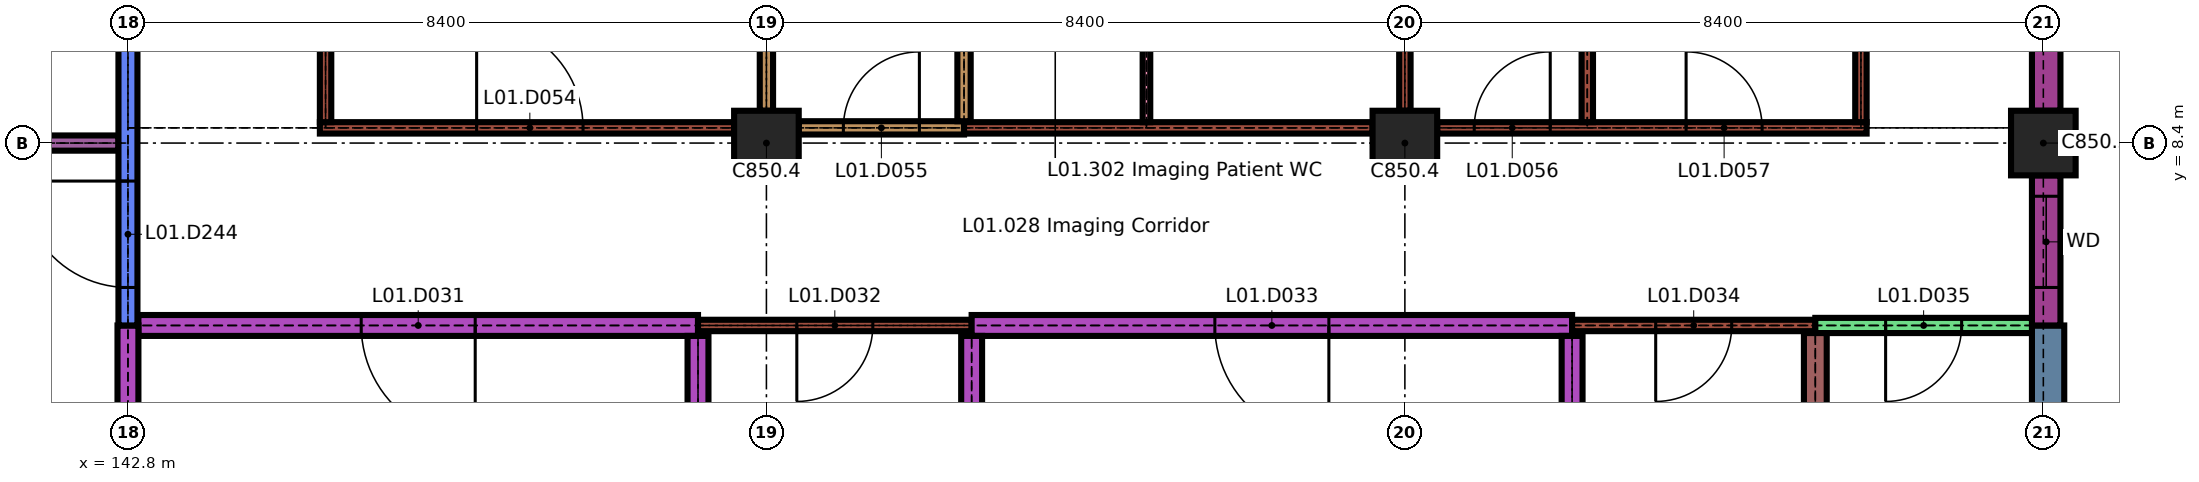
"""IFC4 building model, lengths in metres.
Left out: names, types, materials, properties, quantities, classifications, styles, units other than length and angle.
Written with IfcOpenShell. Run it as: python <this file> out.ifc"""

import sys

from ifc_helpers import new_model, si_unit, direction, frame, frame_2d, origin, origin_2d, place, context, subcontext, project, spatial, rectangle, extrude, element, fill, save


model = new_model("IFC4")
c1 = context("Model", 3, precision=1e-05, world=origin(), true_north=direction((0.0, 1.0)))
c2 = subcontext(c1, "Body", "Model", "MODEL_VIEW")
j1 = project(units=[si_unit("LENGTHUNIT", "METRE"), si_unit("PLANEANGLEUNIT", "RADIAN")], contexts=[c1])
p1 = place(None, origin())
s1 = spatial("IfcSite", under=j1, at=p1, CompositionType="ELEMENT")
p2 = place(p1, origin())
s2 = spatial("IfcBuilding", under=s1, at=p2, CompositionType="ELEMENT")
p3 = place(p2, frame((0.0, 0.0, 4.5)))
s3 = spatial("IfcBuildingStorey", under=s2, at=p3, CompositionType="ELEMENT", Elevation=4.5)
for number, where, z_axis, x_axis in (
    (1, (151.2, 8.4, 0.0), (0.0, 0.0, 1.0), (1.0, 0.0, 0.0)),
    (2, (159.6, 8.4, 0.0), (0.0, 0.0, 1.0), (1.0, 0.0, 0.0)),
    (3, (168.0, 8.4, 0.0), (0.0, 0.0, 1.0), (1.0, 0.0, 0.0)),
):
    element("IfcColumn", number, at=place(p3, frame(where, z_axis=z_axis, x_axis=x_axis)), inside=s3, PredefinedType="COLUMN", context=c2, shape_type="SweptSolid", body=[
        extrude(rectangle(XDim=0.85, YDim=0.85, at=origin_2d()), origin(), (0.0, 0.0, 1.0), 3.45),
    ])
p4 = place(p3, frame((168.062, 0.425, 0.0), z_axis=(0.0, 0.0, 1.0), x_axis=(0.0, 1.0, 0.0)))
e4 = element("IfcWall", 4, at=p4, inside=s3, PredefinedType="SOLIDWALL", context=c2, shape_type="SweptSolid", body=[
    extrude(rectangle(XDim=5.575, YDim=0.425, at=frame_2d((2.788, 0.0))), origin(), (0.0, 0.0, 1.0), 3.15),
])
p5 = place(p3, frame((168.038, 6.0, 0.0), z_axis=(0.0, 0.0, 1.0), x_axis=(0.0, 1.0, 0.0)))
e5 = element("IfcWall", 5, at=p5, inside=s3, PredefinedType="SOLIDWALL", context=c2, shape_type="SweptSolid", body=[
    extrude(rectangle(XDim=1.975, YDim=0.375, at=frame_2d((0.988, 0.0))), origin(), (0.0, 0.0, 1.0), 3.15),
])
p6 = place(p5, frame((0.5, 0.0, 0.9)))
e6 = element("IfcOpeningElement", 6, at=p6, cuts=e5, PredefinedType="OPENING", context=c2, shape_type="SweptSolid", body=[
    extrude(rectangle(XDim=1.2, YDim=1.5, at=frame_2d((0.6, 0.75))), frame((0.0, 0.198, 0.0), z_axis=(0.0, -1.0, 0.0), x_axis=(1.0, 0.0, 0.0)), (0.0, 0.0, 1.0), 0.395),
])
p7 = place(p3, frame((168.038, 8.825, 0.0), z_axis=(0.0, 0.0, 1.0), x_axis=(0.0, 1.0, 0.0)))
e7 = element("IfcWall", 7, at=p7, inside=s3, PredefinedType="SOLIDWALL", context=c2, shape_type="SweptSolid", body=[
    extrude(rectangle(XDim=1.175, YDim=0.375, at=frame_2d((0.587, 0.0))), origin(), (0.0, 0.0, 1.0), 3.15),
])
p8 = place(p3, frame((142.938, 6.0, 0.0), z_axis=(0.0, 0.0, 1.0), x_axis=(1.0, 0.0, 0.0)))
e8 = element("IfcWall", 8, at=p8, inside=s3, PredefinedType="SOLIDWALL", context=c2, shape_type="SweptSolid", body=[
    extrude(rectangle(XDim=7.363, YDim=0.275, at=frame_2d((3.681, 0.0))), origin(), (0.0, 0.0, 1.0), 3.45),
])
p9 = place(p8, frame((2.931, 0.0, 0.0)))
e9 = element("IfcOpeningElement", 9, at=p9, cuts=e8, PredefinedType="OPENING", context=c2, shape_type="SweptSolid", body=[
    extrude(rectangle(XDim=1.5, YDim=2.4, at=frame_2d((0.75, 1.2))), frame((0.0, 0.147, 0.0), z_axis=(0.0, -1.0, 0.0), x_axis=(1.0, 0.0, 0.0)), (0.0, 0.0, 1.0), 0.295),
])
p10 = place(p3, frame((150.3, 6.0, 0.0), z_axis=(0.0, 0.0, 1.0), x_axis=(1.0, 0.0, 0.0)))
e10 = element("IfcWall", 10, at=p10, inside=s3, PredefinedType="PARTITIONING", context=c2, shape_type="SweptSolid", body=[
    extrude(rectangle(XDim=3.6, YDim=0.15, at=frame_2d((1.8, 0.0))), origin(), (0.0, 0.0, 1.0), 3.45),
])
p11 = place(p10, frame((1.3, 0.0, 0.0)))
e11 = element("IfcOpeningElement", 11, at=p11, cuts=e10, PredefinedType="OPENING", context=c2, shape_type="SweptSolid", body=[
    extrude(rectangle(XDim=1.0, YDim=2.1, at=frame_2d((0.5, 1.05))), frame((0.0, 0.085, 0.0), z_axis=(0.0, -1.0, 0.0), x_axis=(1.0, 0.0, 0.0)), (0.0, 0.0, 1.0), 0.17),
])
p12 = place(p3, frame((153.9, 6.0, 0.0), z_axis=(0.0, 0.0, 1.0), x_axis=(1.0, 0.0, 0.0)))
e12 = element("IfcWall", 12, at=p12, inside=s3, PredefinedType="SOLIDWALL", context=c2, shape_type="SweptSolid", body=[
    extrude(rectangle(XDim=7.9, YDim=0.275, at=frame_2d((3.95, 0.0))), origin(), (0.0, 0.0, 1.0), 3.45),
])
p13 = place(p12, frame((3.2, 0.0, 0.0)))
e13 = element("IfcOpeningElement", 13, at=p13, cuts=e12, PredefinedType="OPENING", context=c2, shape_type="SweptSolid", body=[
    extrude(rectangle(XDim=1.5, YDim=2.4, at=frame_2d((0.75, 1.2))), frame((0.0, 0.147, 0.0), z_axis=(0.0, -1.0, 0.0), x_axis=(1.0, 0.0, 0.0)), (0.0, 0.0, 1.0), 0.295),
])
p14 = place(p3, frame((161.8, 6.0, 0.0), z_axis=(0.0, 0.0, 1.0), x_axis=(1.0, 0.0, 0.0)))
e14 = element("IfcWall", 14, at=p14, inside=s3, PredefinedType="PARTITIONING", context=c2, shape_type="SweptSolid", body=[
    extrude(rectangle(XDim=3.2, YDim=0.15, at=frame_2d((1.6, 0.0))), origin(), (0.0, 0.0, 1.0), 3.45),
])
p15 = place(p14, frame((1.1, 0.0, 0.0)))
e15 = element("IfcOpeningElement", 15, at=p15, cuts=e14, PredefinedType="OPENING", context=c2, shape_type="SweptSolid", body=[
    extrude(rectangle(XDim=1.0, YDim=2.1, at=frame_2d((0.5, 1.05))), frame((0.0, 0.085, 0.0), z_axis=(0.0, -1.0, 0.0), x_axis=(1.0, 0.0, 0.0)), (0.0, 0.0, 1.0), 0.17),
])
p16 = place(p3, frame((165.0, 6.0, 0.0), z_axis=(0.0, 0.0, 1.0), x_axis=(1.0, 0.0, 0.0)))
e16 = element("IfcWall", 16, at=p16, inside=s3, PredefinedType="SOLIDWALL", context=c2, shape_type="SweptSolid", body=[
    extrude(rectangle(XDim=2.85, YDim=0.2, at=frame_2d((1.425, 0.0))), origin(), (0.0, 0.0, 1.0), 3.45),
])
p17 = place(p16, frame((0.925, 0.0, 0.0)))
e17 = element("IfcOpeningElement", 17, at=p17, cuts=e16, PredefinedType="OPENING", context=c2, shape_type="SweptSolid", body=[
    extrude(rectangle(XDim=1.0, YDim=2.1, at=frame_2d((0.5, 1.05))), frame((0.0, 0.11, 0.0), z_axis=(0.0, -1.0, 0.0), x_axis=(1.0, 0.0, 0.0)), (0.0, 0.0, 1.0), 0.22),
])
p18 = place(p3, frame((134.5, 8.4, 0.0), z_axis=(0.0, 0.0, 1.0), x_axis=(1.0, 0.0, 0.0)))
e18 = element("IfcWall", 18, at=p18, inside=s3, PredefinedType="PARTITIONING", context=c2, shape_type="SweptSolid", body=[
    extrude(rectangle(XDim=8.175, YDim=0.2, at=frame_2d((4.087, 0.0))), origin(), (0.0, 0.0, 1.0), 3.45),
])
p19 = place(p18, frame((3.387, 0.0, 0.0)))
e19 = element("IfcOpeningElement", 19, at=p19, cuts=e18, PredefinedType="OPENING", context=c2, shape_type="SweptSolid", body=[
    extrude(rectangle(XDim=1.4, YDim=2.1, at=frame_2d((0.7, 1.05))), frame((0.0, 0.11, 0.0), z_axis=(0.0, -1.0, 0.0), x_axis=(1.0, 0.0, 0.0)), (0.0, 0.0, 1.0), 0.22),
])
p20 = place(p3, frame((145.325, 8.6, 0.0), z_axis=(0.0, 0.0, 1.0), x_axis=(1.0, 0.0, 0.0)))
e20 = element("IfcWall", 20, at=p20, inside=s3, PredefinedType="PARTITIONING", context=c2, shape_type="SweptSolid", body=[
    extrude(rectangle(XDim=5.45, YDim=0.15, at=frame_2d((2.725, 0.0))), origin(), (0.0, 0.0, 1.0), 3.45),
])
p21 = place(p20, frame((2.062, 0.0, 0.0)))
e21 = element("IfcOpeningElement", 21, at=p21, cuts=e20, PredefinedType="OPENING", context=c2, shape_type="SweptSolid", body=[
    extrude(rectangle(XDim=1.4, YDim=2.1, at=frame_2d((0.7, 1.05))), frame((0.0, 0.085, 0.0), z_axis=(0.0, -1.0, 0.0), x_axis=(1.0, 0.0, 0.0)), (0.0, 0.0, 1.0), 0.17),
])
p22 = place(p3, frame((151.625, 8.6, 0.0), z_axis=(0.0, 0.0, 1.0), x_axis=(1.0, 0.0, 0.0)))
e22 = element("IfcWall", 22, at=p22, inside=s3, PredefinedType="PARTITIONING", context=c2, shape_type="SweptSolid", body=[
    extrude(rectangle(XDim=2.175, YDim=0.175, at=frame_2d((1.087, 0.0))), origin(), (0.0, 0.0, 1.0), 3.45),
])
p23 = place(p22, frame((0.587, 0.0, 0.0)))
e23 = element("IfcOpeningElement", 23, at=p23, cuts=e22, PredefinedType="OPENING", context=c2, shape_type="SweptSolid", body=[
    extrude(rectangle(XDim=1.0, YDim=2.1, at=frame_2d((0.5, 1.05))), frame((0.0, 0.097, 0.0), z_axis=(0.0, -1.0, 0.0), x_axis=(1.0, 0.0, 0.0)), (0.0, 0.0, 1.0), 0.195),
])
p24 = place(p3, frame((153.8, 8.6, 0.0), z_axis=(0.0, 0.0, 1.0), x_axis=(1.0, 0.0, 0.0)))
e24 = element("IfcWall", 24, at=p24, inside=s3, PredefinedType="PARTITIONING", context=c2, shape_type="SweptSolid", body=[
    extrude(rectangle(XDim=5.375, YDim=0.15, at=frame_2d((2.688, 0.0))), origin(), (0.0, 0.0, 1.0), 3.45),
])
p25 = place(p3, frame((160.025, 8.6, 0.0), z_axis=(0.0, 0.0, 1.0), x_axis=(1.0, 0.0, 0.0)))
e25 = element("IfcWall", 25, at=p25, inside=s3, PredefinedType="PARTITIONING", context=c2, shape_type="SweptSolid", body=[
    extrude(rectangle(XDim=5.65, YDim=0.15, at=frame_2d((2.825, 0.0))), origin(), (0.0, 0.0, 1.0), 3.45),
])
p26 = place(p25, frame((0.488, 0.0, 0.0)))
e26 = element("IfcOpeningElement", 26, at=p26, cuts=e25, PredefinedType="OPENING", context=c2, shape_type="SweptSolid", body=[
    extrude(rectangle(XDim=1.0, YDim=2.1, at=frame_2d((0.5, 1.05))), frame((0.0, 0.085, 0.0), z_axis=(0.0, -1.0, 0.0), x_axis=(1.0, 0.0, 0.0)), (0.0, 0.0, 1.0), 0.17),
])
p27 = place(p25, frame((3.275, 0.0, 0.0)))
e27 = element("IfcOpeningElement", 27, at=p27, cuts=e25, PredefinedType="OPENING", context=c2, shape_type="SweptSolid", body=[
    extrude(rectangle(XDim=1.0, YDim=2.1, at=frame_2d((0.5, 1.05))), frame((0.0, 0.085, 0.0), z_axis=(0.0, -1.0, 0.0), x_axis=(1.0, 0.0, 0.0)), (0.0, 0.0, 1.0), 0.17),
])
p28 = place(p3, frame((142.8, 3.6, 0.0), z_axis=(0.0, 0.0, 1.0), x_axis=(0.0, 1.0, 0.0)))
e28 = element("IfcWall", 28, at=p28, inside=s3, PredefinedType="SOLIDWALL", context=c2, shape_type="SweptSolid", body=[
    extrude(rectangle(XDim=2.4, YDim=0.275, at=frame_2d((1.2, 0.0))), origin(), (0.0, 0.0, 1.0), 3.45),
])
p29 = place(p3, frame((142.8, 6.0, 0.0), z_axis=(0.0, 0.0, 1.0), x_axis=(0.0, 1.0, 0.0)))
e29 = element("IfcWall", 29, at=p29, inside=s3, PredefinedType="SOLIDWALL", context=c2, shape_type="SweptSolid", body=[
    extrude(rectangle(XDim=10.7, YDim=0.25, at=frame_2d((5.35, 0.0))), origin(), (0.0, 0.0, 1.0), 3.45),
])
p30 = place(p29, frame((0.5, 0.0, 0.0)))
e30 = element("IfcOpeningElement", 30, at=p30, cuts=e29, PredefinedType="OPENING", context=c2, shape_type="SweptSolid", body=[
    extrude(rectangle(XDim=1.4, YDim=2.1, at=frame_2d((0.7, 1.05))), frame((0.0, 0.135, 0.0), z_axis=(0.0, -1.0, 0.0), x_axis=(1.0, 0.0, 0.0)), (0.0, 0.0, 1.0), 0.27),
])
p31 = place(p29, frame((8.55, 0.0, 0.0)))
e31 = element("IfcOpeningElement", 31, at=p31, cuts=e29, PredefinedType="OPENING", context=c2, shape_type="SweptSolid", body=[
    extrude(rectangle(XDim=1.8, YDim=2.4, at=frame_2d((0.9, 1.2))), frame((0.0, 0.135, 0.0), z_axis=(0.0, -1.0, 0.0), x_axis=(1.0, 0.0, 0.0)), (0.0, 0.0, 1.0), 0.27),
])
p32 = place(p3, frame((145.4, 8.675, 0.0), z_axis=(0.0, 0.0, 1.0), x_axis=(0.0, 1.0, 0.0)))
e32 = element("IfcWall", 32, at=p32, inside=s3, PredefinedType="PARTITIONING", context=c2, shape_type="SweptSolid", body=[
    extrude(rectangle(XDim=5.45, YDim=0.15, at=frame_2d((2.725, 0.0))), origin(), (0.0, 0.0, 1.0), 3.45),
])
p33 = place(p3, frame((150.3, 0.15, 0.0), z_axis=(0.0, 0.0, 1.0), x_axis=(0.0, 1.0, 0.0)))
e33 = element("IfcWall", 33, at=p33, inside=s3, PredefinedType="SOLIDWALL", context=c2, shape_type="SweptSolid", body=[
    extrude(rectangle(XDim=5.713, YDim=0.275, at=frame_2d((2.856, 0.0))), origin(), (0.0, 0.0, 1.0), 3.45),
])
p34 = place(p33, frame((2.356, 0.0, 0.0)))
e34 = element("IfcOpeningElement", 34, at=p34, cuts=e33, PredefinedType="OPENING", context=c2, shape_type="SweptSolid", body=[
    extrude(rectangle(XDim=1.0, YDim=2.1, at=frame_2d((0.5, 1.05))), frame((0.0, 0.147, 0.0), z_axis=(0.0, -1.0, 0.0), x_axis=(1.0, 0.0, 0.0)), (0.0, 0.0, 1.0), 0.295),
])
p35 = place(p3, frame((151.2, 8.825, 0.0), z_axis=(0.0, 0.0, 1.0), x_axis=(0.0, 1.0, 0.0)))
e35 = element("IfcWall", 35, at=p35, inside=s3, PredefinedType="PARTITIONING", context=c2, shape_type="SweptSolid", body=[
    extrude(rectangle(XDim=5.288, YDim=0.175, at=frame_2d((2.644, 0.0))), origin(), (0.0, 0.0, 1.0), 3.45),
])
p36 = place(p3, frame((153.8, 8.688, 0.0), z_axis=(0.0, 0.0, 1.0), x_axis=(0.0, 1.0, 0.0)))
e36 = element("IfcWall", 36, at=p36, inside=s3, PredefinedType="PARTITIONING", context=c2, shape_type="SweptSolid", body=[
    extrude(rectangle(XDim=5.425, YDim=0.175, at=frame_2d((2.712, 0.0))), origin(), (0.0, 0.0, 1.0), 3.45),
])
p37 = place(p3, frame((153.9, 0.15, 0.0), z_axis=(0.0, 0.0, 1.0), x_axis=(0.0, 1.0, 0.0)))
e37 = element("IfcWall", 37, at=p37, inside=s3, PredefinedType="SOLIDWALL", context=c2, shape_type="SweptSolid", body=[
    extrude(rectangle(XDim=5.713, YDim=0.275, at=frame_2d((2.856, 0.0))), origin(), (0.0, 0.0, 1.0), 3.45),
])
p38 = place(p3, frame((156.2, 8.675, 0.0), z_axis=(0.0, 0.0, 1.0), x_axis=(0.0, 1.0, 0.0)))
e38 = element("IfcWall", 38, at=p38, inside=s3, PredefinedType="PARTITIONING", context=c2, shape_type="SweptSolid", body=[
    extrude(rectangle(XDim=5.45, YDim=0.1, at=frame_2d((2.725, 0.0))), origin(), (0.0, 0.0, 1.0), 3.45),
])
p39 = place(p3, frame((159.6, 8.825, 0.0), z_axis=(0.0, 0.0, 1.0), x_axis=(0.0, 1.0, 0.0)))
e39 = element("IfcWall", 39, at=p39, inside=s3, PredefinedType="PARTITIONING", context=c2, shape_type="SweptSolid", body=[
    extrude(rectangle(XDim=5.3, YDim=0.15, at=frame_2d((2.65, 0.0))), origin(), (0.0, 0.0, 1.0), 3.45),
])
p40 = place(p3, frame((161.8, 0.15, 0.0), z_axis=(0.0, 0.0, 1.0), x_axis=(0.0, 1.0, 0.0)))
e40 = element("IfcWall", 40, at=p40, inside=s3, PredefinedType="SOLIDWALL", context=c2, shape_type="SweptSolid", body=[
    extrude(rectangle(XDim=5.713, YDim=0.275, at=frame_2d((2.856, 0.0))), origin(), (0.0, 0.0, 1.0), 3.45),
])
p41 = place(p40, frame((2.356, 0.0, 0.0)))
e41 = element("IfcOpeningElement", 41, at=p41, cuts=e40, PredefinedType="OPENING", context=c2, shape_type="SweptSolid", body=[
    extrude(rectangle(XDim=1.0, YDim=2.1, at=frame_2d((0.5, 1.05))), frame((0.0, 0.147, 0.0), z_axis=(0.0, -1.0, 0.0), x_axis=(1.0, 0.0, 0.0)), (0.0, 0.0, 1.0), 0.295),
])
p42 = place(p3, frame((162.0, 8.675, 0.0), z_axis=(0.0, 0.0, 1.0), x_axis=(0.0, 1.0, 0.0)))
e42 = element("IfcWall", 42, at=p42, inside=s3, PredefinedType="PARTITIONING", context=c2, shape_type="SweptSolid", body=[
    extrude(rectangle(XDim=5.45, YDim=0.15, at=frame_2d((2.725, 0.0))), origin(), (0.0, 0.0, 1.0), 3.45),
])
p43 = place(p3, frame((165.0, 0.15, 0.0), z_axis=(0.0, 0.0, 1.0), x_axis=(0.0, 1.0, 0.0)))
e43 = element("IfcWall", 43, at=p43, inside=s3, PredefinedType="SOLIDWALL", context=c2, shape_type="SweptSolid", body=[
    extrude(rectangle(XDim=5.75, YDim=0.3, at=frame_2d((2.875, 0.0))), origin(), (0.0, 0.0, 1.0), 3.45),
])
p44 = place(p3, frame((165.6, 8.675, 0.0), z_axis=(0.0, 0.0, 1.0), x_axis=(0.0, 1.0, 0.0)))
e44 = element("IfcWall", 44, at=p44, inside=s3, PredefinedType="PARTITIONING", context=c2, shape_type="SweptSolid", body=[
    extrude(rectangle(XDim=5.45, YDim=0.15, at=frame_2d((2.725, 0.0))), origin(), (0.0, 0.0, 1.0), 3.45),
])
p45 = place(p6, origin())
e45 = element("IfcWindow", 45, at=p45, inside=s3, PartitioningType="SINGLE_PANEL", PredefinedType="WINDOW", context=c2, shape_type="SweptSolid", body=[
    extrude(rectangle(XDim=1.2, YDim=1.5, at=frame_2d((0.6, 0.75))), frame((0.0, 0.03, 0.0), z_axis=(0.0, -1.0, 0.0), x_axis=(1.0, 0.0, 0.0)), (0.0, 0.0, 1.0), 0.06),
])
fill(e6, e45)
p46 = place(p9, origin())
e46 = element("IfcDoor", 46, at=p46, inside=s3, OperationType="SINGLE_SWING_RIGHT", PredefinedType="DOOR", context=c2, shape_type="SweptSolid", body=[
    extrude(rectangle(XDim=1.5, YDim=2.4, at=frame_2d((0.75, 1.2))), frame((0.0, 0.045, 0.0), z_axis=(0.0, -1.0, 0.0), x_axis=(1.0, 0.0, 0.0)), (0.0, 0.0, 1.0), 0.09),
])
fill(e9, e46)
p47 = place(p11, origin())
e47 = element("IfcDoor", 47, at=p47, inside=s3, OperationType="SINGLE_SWING_LEFT", PredefinedType="DOOR", context=c2, shape_type="SweptSolid", body=[
    extrude(rectangle(XDim=1.0, YDim=2.1, at=frame_2d((0.5, 1.05))), frame((0.0, 0.025, 0.0), z_axis=(0.0, -1.0, 0.0), x_axis=(1.0, 0.0, 0.0)), (0.0, 0.0, 1.0), 0.05),
])
fill(e11, e47)
p48 = place(p13, origin())
e48 = element("IfcDoor", 48, at=p48, inside=s3, OperationType="SINGLE_SWING_RIGHT", PredefinedType="DOOR", context=c2, shape_type="SweptSolid", body=[
    extrude(rectangle(XDim=1.5, YDim=2.4, at=frame_2d((0.75, 1.2))), frame((0.0, 0.045, 0.0), z_axis=(0.0, -1.0, 0.0), x_axis=(1.0, 0.0, 0.0)), (0.0, 0.0, 1.0), 0.09),
])
fill(e13, e48)
p49 = place(p15, origin())
e49 = element("IfcDoor", 49, at=p49, inside=s3, OperationType="SINGLE_SWING_LEFT", PredefinedType="DOOR", context=c2, shape_type="SweptSolid", body=[
    extrude(rectangle(XDim=1.0, YDim=2.1, at=frame_2d((0.5, 1.05))), frame((0.0, 0.025, 0.0), z_axis=(0.0, -1.0, 0.0), x_axis=(1.0, 0.0, 0.0)), (0.0, 0.0, 1.0), 0.05),
])
fill(e15, e49)
p50 = place(p17, origin())
e50 = element("IfcDoor", 50, at=p50, inside=s3, OperationType="SINGLE_SWING_LEFT", PredefinedType="DOOR", context=c2, shape_type="SweptSolid", body=[
    extrude(rectangle(XDim=1.0, YDim=2.1, at=frame_2d((0.5, 1.05))), frame((0.0, 0.025, 0.0), z_axis=(0.0, -1.0, 0.0), x_axis=(1.0, 0.0, 0.0)), (0.0, 0.0, 1.0), 0.05),
])
fill(e17, e50)
p51 = place(p21, origin())
e51 = element("IfcDoor", 51, at=p51, inside=s3, OperationType="SINGLE_SWING_RIGHT", PredefinedType="DOOR", context=c2, shape_type="SweptSolid", body=[
    extrude(rectangle(XDim=1.4, YDim=2.1, at=frame_2d((0.7, 1.05))), frame((0.0, 0.025, 0.0), z_axis=(0.0, -1.0, 0.0), x_axis=(1.0, 0.0, 0.0)), (0.0, 0.0, 1.0), 0.05),
])
fill(e21, e51)
p52 = place(p23, origin())
e52 = element("IfcDoor", 52, at=p52, inside=s3, OperationType="SINGLE_SWING_LEFT", PredefinedType="DOOR", context=c2, shape_type="SweptSolid", body=[
    extrude(rectangle(XDim=1.0, YDim=2.1, at=frame_2d((0.5, 1.05))), frame((0.0, 0.035, 0.0), z_axis=(0.0, -1.0, 0.0), x_axis=(1.0, 0.0, 0.0)), (0.0, 0.0, 1.0), 0.07),
])
fill(e23, e52)
p53 = place(p26, origin())
e53 = element("IfcDoor", 53, at=p53, inside=s3, OperationType="SINGLE_SWING_LEFT", PredefinedType="DOOR", context=c2, shape_type="SweptSolid", body=[
    extrude(rectangle(XDim=1.0, YDim=2.1, at=frame_2d((0.5, 1.05))), frame((0.0, 0.025, 0.0), z_axis=(0.0, -1.0, 0.0), x_axis=(1.0, 0.0, 0.0)), (0.0, 0.0, 1.0), 0.05),
])
fill(e26, e53)
p54 = place(p27, origin())
e54 = element("IfcDoor", 54, at=p54, inside=s3, OperationType="SINGLE_SWING_RIGHT", PredefinedType="DOOR", context=c2, shape_type="SweptSolid", body=[
    extrude(rectangle(XDim=1.0, YDim=2.1, at=frame_2d((0.5, 1.05))), frame((0.0, 0.025, 0.0), z_axis=(0.0, -1.0, 0.0), x_axis=(1.0, 0.0, 0.0)), (0.0, 0.0, 1.0), 0.05),
])
fill(e27, e54)
p55 = place(p30, origin())
e55 = element("IfcDoor", 55, at=p55, inside=s3, OperationType="SINGLE_SWING_LEFT", PredefinedType="DOOR", context=c2, shape_type="SweptSolid", body=[
    extrude(rectangle(XDim=1.4, YDim=2.1, at=frame_2d((0.7, 1.05))), frame((0.0, 0.03, 0.0), z_axis=(0.0, -1.0, 0.0), x_axis=(1.0, 0.0, 0.0)), (0.0, 0.0, 1.0), 0.06),
])
fill(e30, e55)
save(model, sys.argv[1])
